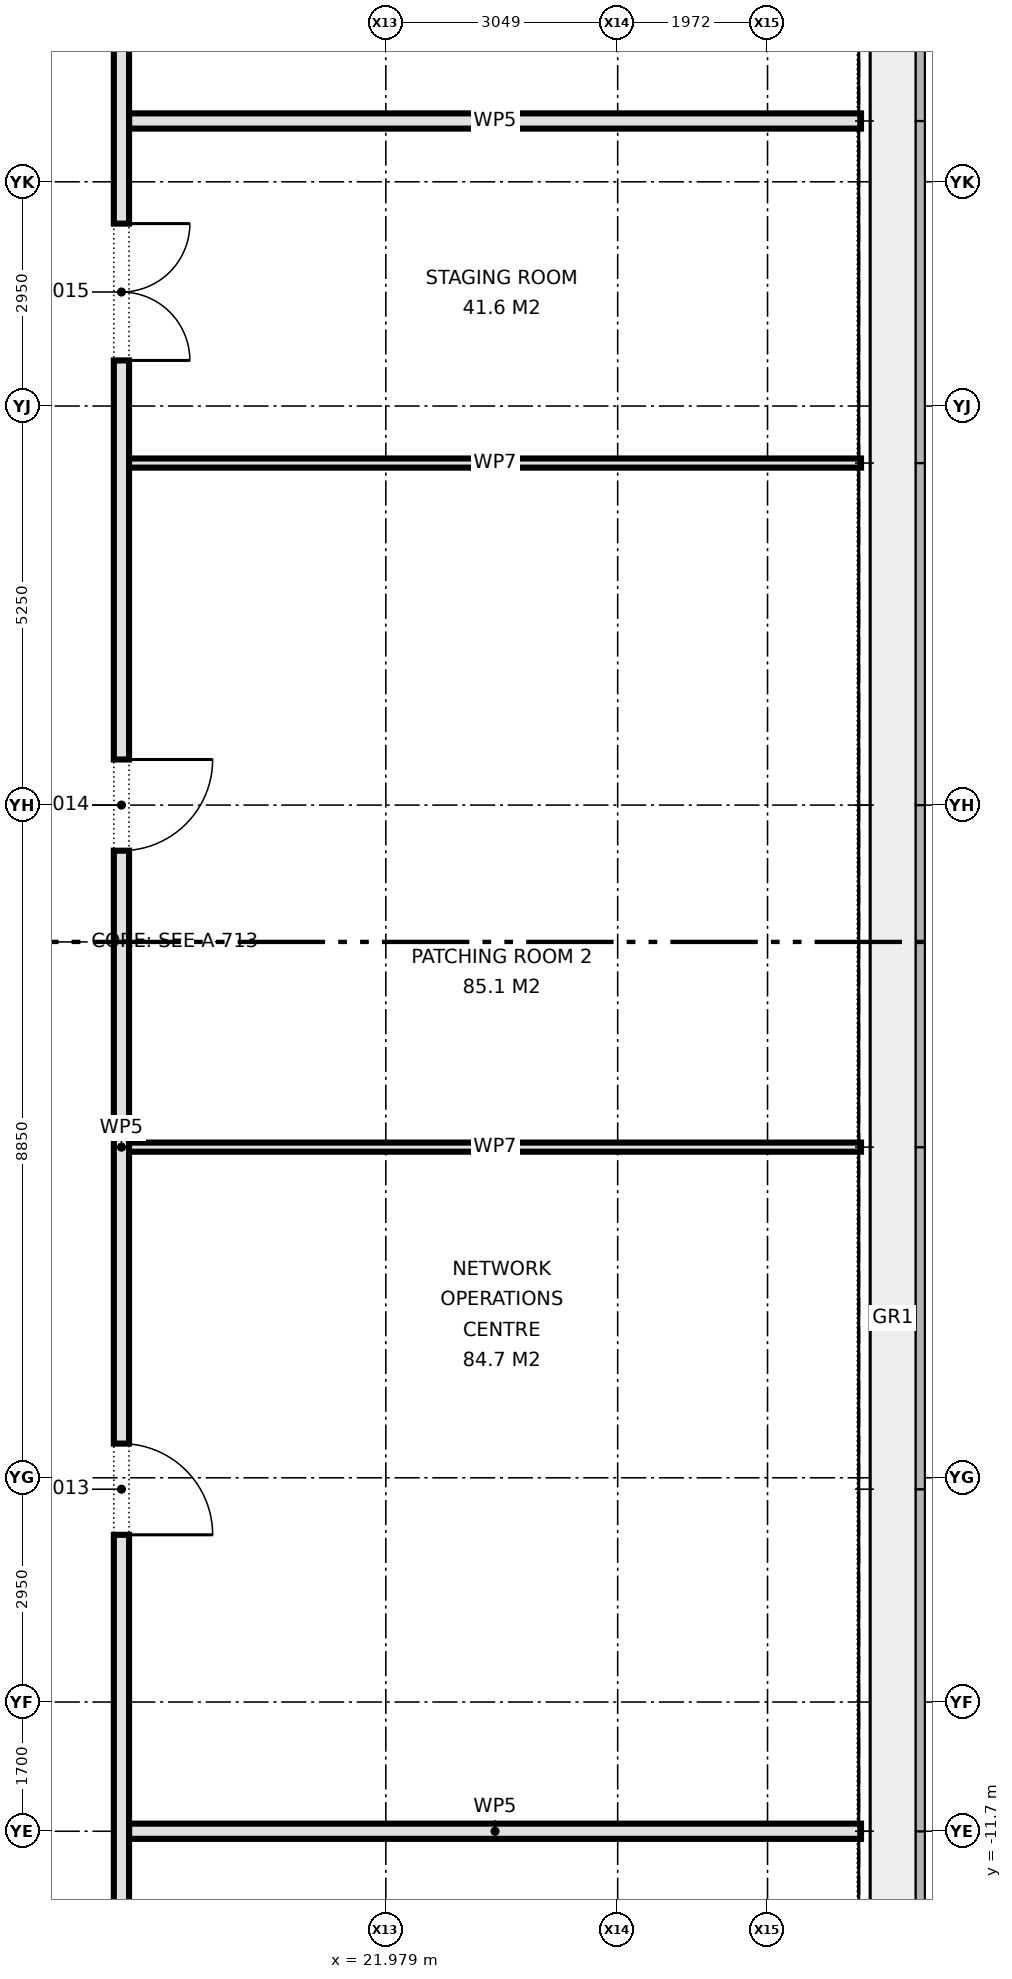
"""IFC4 building model, lengths in metres.
Left out: names, types, materials, properties, quantities, classifications, styles, units other than length and angle.
Written with IfcOpenShell. Run it as: python <this file> out.ifc"""

import sys

from ifc_helpers import new_model, si_unit, direction, frame, frame_2d, origin, place, context, subcontext, project, spatial, rectangle, extrude, element, fill, save


model = new_model("IFC4")
c1 = context("Model", 3, precision=1e-05, world=origin(), true_north=direction((0.0, 1.0)))
c2 = subcontext(c1, "Body", "Model", "MODEL_VIEW")
j1 = project(units=[si_unit("LENGTHUNIT", "METRE"), si_unit("PLANEANGLEUNIT", "RADIAN")], contexts=[c1])
p1 = place(None, origin())
s1 = spatial("IfcSite", under=j1, at=p1, CompositionType="ELEMENT")
p2 = place(p1, origin())
s2 = spatial("IfcBuilding", under=s1, at=p2, CompositionType="ELEMENT")
p3 = place(p2, frame((0.0, 0.0, 90.8)))
s3 = spatial("IfcBuildingStorey", under=s2, at=p3, CompositionType="ELEMENT", Elevation=90.8)
for number, where, z_axis, x_axis in (
    (1, (18.6, -11.7, 0.0), (0.0, 0.0, 1.0), (1.0, 0.0, 0.0)),
    (2, (18.6, 10.8, 0.0), (0.0, 0.0, 1.0), (1.0, 0.0, 0.0)),
):
    element("IfcWall", number, at=place(p3, frame(where, z_axis=z_axis, x_axis=x_axis)), inside=s3, PredefinedType="PARTITIONING", context=c2, shape_type="SweptSolid", body=[
        extrude(rectangle(XDim=9.63, YDim=0.2, at=frame_2d((4.815, 0.0))), origin(), (0.0, 0.0, 1.0), 4.2),
    ])
p4 = place(p3, frame((18.5, -13.4, 0.0), z_axis=(0.0, 0.0, 1.0), x_axis=(0.0, 1.0, 0.0)))
e3 = element("IfcWall", 3, at=p4, inside=s3, PredefinedType="PARTITIONING", context=c2, shape_type="SweptSolid", body=[
    extrude(rectangle(XDim=26.8, YDim=0.2, at=frame_2d((13.4, 0.0))), origin(), (0.0, 0.0, 1.0), 4.2),
])
p5 = place(p4, frame((5.6, 0.0, 0.0)))
e4 = element("IfcOpeningElement", 4, at=p5, cuts=e3, PredefinedType="OPENING", context=c2, shape_type="SweptSolid", body=[
    extrude(rectangle(XDim=1.2, YDim=2.1, at=frame_2d((0.6, 1.05))), frame((0.0, 0.11, 0.0), z_axis=(0.0, -1.0, 0.0), x_axis=(1.0, 0.0, 0.0)), (0.0, 0.0, 1.0), 0.22),
])
p6 = place(p4, frame((14.6, 0.0, 0.0)))
e5 = element("IfcOpeningElement", 5, at=p6, cuts=e3, PredefinedType="OPENING", context=c2, shape_type="SweptSolid", body=[
    extrude(rectangle(XDim=1.2, YDim=2.1, at=frame_2d((0.6, 1.05))), frame((0.0, 0.11, 0.0), z_axis=(0.0, -1.0, 0.0), x_axis=(1.0, 0.0, 0.0)), (0.0, 0.0, 1.0), 0.22),
])
p7 = place(p4, frame((21.05, 0.0, 0.0)))
e6 = element("IfcOpeningElement", 6, at=p7, cuts=e3, PredefinedType="OPENING", context=c2, shape_type="SweptSolid", body=[
    extrude(rectangle(XDim=1.8, YDim=2.1, at=frame_2d((0.9, 1.05))), frame((0.0, 0.11, 0.0), z_axis=(0.0, -1.0, 0.0), x_axis=(1.0, 0.0, 0.0)), (0.0, 0.0, 1.0), 0.22),
])
for number, where, z_axis, x_axis in (
    (7, (18.6, -2.7, 0.0), (0.0, 0.0, 1.0), (1.0, 0.0, 0.0)),
    (8, (18.6, 6.3, 0.0), (0.0, 0.0, 1.0), (1.0, 0.0, 0.0)),
):
    element("IfcWall", number, at=place(p3, frame(where, z_axis=z_axis, x_axis=x_axis)), inside=s3, PredefinedType="PARTITIONING", context=c2, shape_type="SweptSolid", body=[
        extrude(rectangle(XDim=9.63, YDim=0.12, at=frame_2d((4.815, 0.0))), origin(), (0.0, 0.0, 1.0), 4.2),
    ])
p8 = place(p5, frame((1.2, 0.0, 0.0), z_axis=(0.0, 0.0, 1.0), x_axis=(-1.0, 0.0, 0.0)))
e9 = element("IfcDoor", 9, at=p8, inside=s3, OperationType="SINGLE_SWING_RIGHT", PredefinedType="DOOR", context=c2, shape_type="SweptSolid", body=[
    extrude(rectangle(XDim=1.2, YDim=2.1, at=frame_2d((0.6, 1.05))), frame((0.0, 0.025, 0.0), z_axis=(0.0, -1.0, 0.0), x_axis=(1.0, 0.0, 0.0)), (0.0, 0.0, 1.0), 0.05),
])
fill(e4, e9)
p9 = place(p6, frame((1.2, 0.0, 0.0), z_axis=(0.0, 0.0, 1.0), x_axis=(-1.0, 0.0, 0.0)))
e10 = element("IfcDoor", 10, at=p9, inside=s3, OperationType="SINGLE_SWING_LEFT", PredefinedType="DOOR", context=c2, shape_type="SweptSolid", body=[
    extrude(rectangle(XDim=1.2, YDim=2.1, at=frame_2d((0.6, 1.05))), frame((0.0, 0.025, 0.0), z_axis=(0.0, -1.0, 0.0), x_axis=(1.0, 0.0, 0.0)), (0.0, 0.0, 1.0), 0.05),
])
fill(e5, e10)
p10 = place(p7, frame((1.8, 0.0, 0.0), z_axis=(0.0, 0.0, 1.0), x_axis=(-1.0, 0.0, 0.0)))
e11 = element("IfcDoor", 11, at=p10, inside=s3, OperationType="DOUBLE_DOOR_SINGLE_SWING", PredefinedType="DOOR", context=c2, shape_type="SweptSolid", body=[
    extrude(rectangle(XDim=1.8, YDim=2.1, at=frame_2d((0.9, 1.05))), frame((0.0, 0.025, 0.0), z_axis=(0.0, -1.0, 0.0), x_axis=(1.0, 0.0, 0.0)), (0.0, 0.0, 1.0), 0.05),
])
fill(e6, e11)
save(model, sys.argv[1])
